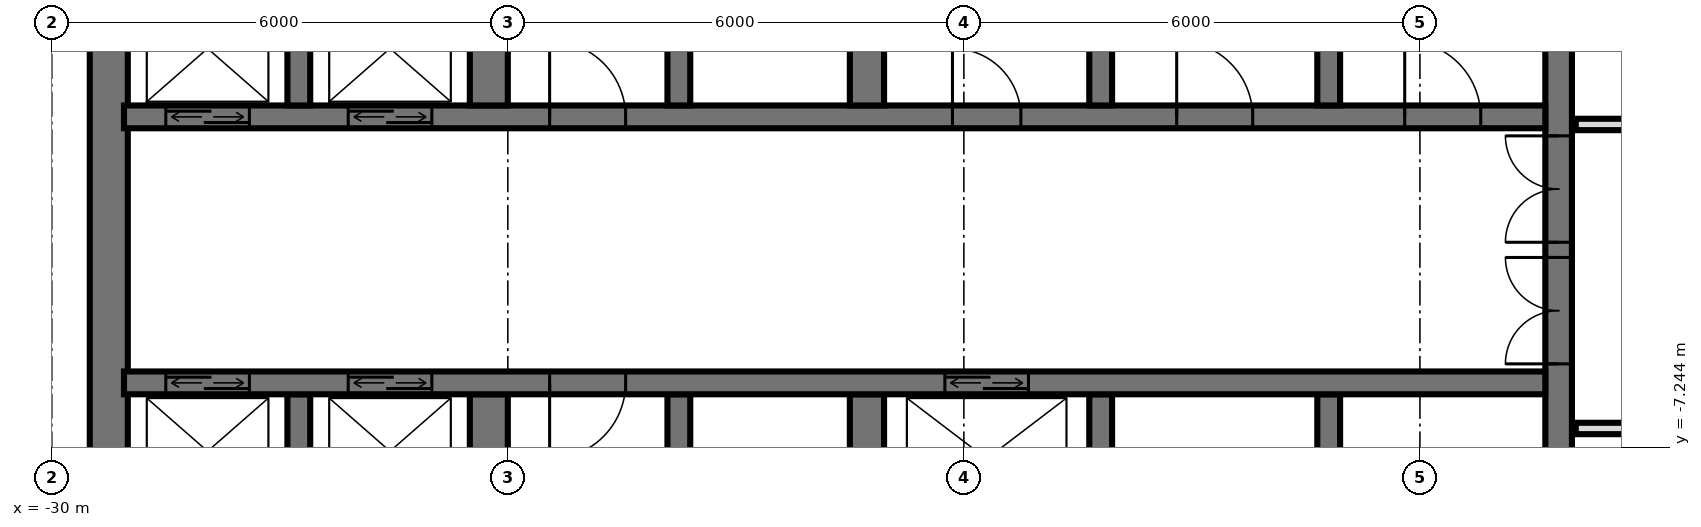
"""IFC4 building model, lengths in metres.
Left out: names, types, materials, properties, quantities, classifications, styles, units other than length and angle.
Written with IfcOpenShell. Run it as: python <this file> out.ifc"""

import sys

from ifc_helpers import new_model, si_unit, direction, frame, frame_2d, origin, place, context, subcontext, project, spatial, rectangle, extrude, element, fill, save


model = new_model("IFC4")
c1 = context("Model", 3, precision=1e-05, world=origin(), true_north=direction((0.0, 1.0)))
c2 = subcontext(c1, "Body", "Model", "MODEL_VIEW")
j1 = project(units=[si_unit("LENGTHUNIT", "METRE"), si_unit("PLANEANGLEUNIT", "RADIAN")], contexts=[c1])
p1 = place(None, origin())
s1 = spatial("IfcSite", under=j1, at=p1, CompositionType="ELEMENT")
p2 = place(p1, origin())
s2 = spatial("IfcBuilding", under=s1, at=p2, CompositionType="ELEMENT")
p3 = place(p2, frame((0.0, 0.0, 96.0)))
s3 = spatial("IfcBuildingStorey", under=s2, at=p3, CompositionType="ELEMENT", Elevation=96.0)
p4 = place(p3, frame((-10.175, -14.55, 0.0), z_axis=(0.0, 0.0, 1.0), x_axis=(0.0, 1.0, 0.0)))
e1 = element("IfcWall", 1, at=p4, inside=s3, PredefinedType="SHEAR", context=c2, shape_type="SweptSolid", body=[
    extrude(rectangle(XDim=14.1, YDim=0.35, at=frame_2d((7.05, 0.0))), origin(), (0.0, 0.0, 1.0), 3.6),
])
p5 = place(p4, frame((8.4, 0.0, 0.0)))
e2 = element("IfcOpeningElement", 2, at=p5, cuts=e1, PredefinedType="OPENING", context=c2, shape_type="SweptSolid", body=[
    extrude(rectangle(XDim=1.4, YDim=2.4, at=frame_2d((0.7, 1.2))), frame((0.0, 0.185, 0.0), z_axis=(0.0, -1.0, 0.0), x_axis=(1.0, 0.0, 0.0)), (0.0, 0.0, 1.0), 0.37),
])
p6 = place(p4, frame((10.0, 0.0, 0.0)))
e3 = element("IfcOpeningElement", 3, at=p6, cuts=e1, PredefinedType="OPENING", context=c2, shape_type="SweptSolid", body=[
    extrude(rectangle(XDim=1.4, YDim=2.4, at=frame_2d((0.7, 1.2))), frame((0.0, 0.185, 0.0), z_axis=(0.0, -1.0, 0.0), x_axis=(1.0, 0.0, 0.0)), (0.0, 0.0, 1.0), 0.37),
])
p7 = place(p4, frame((4.0, 0.0, 0.0)))
e4 = element("IfcOpeningElement", 4, at=p7, cuts=e1, PredefinedType="OPENING", context=c2, shape_type="SweptSolid", body=[
    extrude(rectangle(XDim=1.2, YDim=2.1, at=frame_2d((0.6, 1.05))), frame((0.0, 0.185, 0.0), z_axis=(0.0, -1.0, 0.0), x_axis=(1.0, 0.0, 0.0)), (0.0, 0.0, 1.0), 0.37),
])
p8 = place(p3, frame((-29.25, -14.55, 0.0), z_axis=(0.0, 0.0, 1.0), x_axis=(0.0, 1.0, 0.0)))
e5 = element("IfcWall", 5, at=p8, inside=s3, PredefinedType="SHEAR", context=c2, shape_type="SweptSolid", body=[
    extrude(rectangle(XDim=14.1, YDim=0.5, at=frame_2d((7.05, 0.0))), origin(), (0.0, 0.0, 1.0), 3.6),
])
p9 = place(p3, frame((-29.05, -2.9, 0.0), z_axis=(0.0, 0.0, 1.0), x_axis=(1.0, 0.0, 0.0)))
e6 = element("IfcWall", 6, at=p9, inside=s3, PredefinedType="SHEAR", context=c2, shape_type="SweptSolid", body=[
    extrude(rectangle(XDim=18.7, YDim=0.3, at=frame_2d((9.35, 0.0))), origin(), (0.0, 0.0, 1.0), 3.6),
])
p10 = place(p9, frame((2.95, 0.0, 0.0)))
e7 = element("IfcOpeningElement", 7, at=p10, cuts=e6, PredefinedType="OPENING", context=c2, shape_type="SweptSolid", body=[
    extrude(rectangle(XDim=1.1, YDim=2.1, at=frame_2d((0.55, 1.05))), frame((0.0, 0.16, 0.0), z_axis=(0.0, -1.0, 0.0), x_axis=(1.0, 0.0, 0.0)), (0.0, 0.0, 1.0), 0.32),
])
p11 = place(p9, frame((0.55, 0.0, 0.0)))
e8 = element("IfcOpeningElement", 8, at=p11, cuts=e6, PredefinedType="OPENING", context=c2, shape_type="SweptSolid", body=[
    extrude(rectangle(XDim=1.1, YDim=2.1, at=frame_2d((0.55, 1.05))), frame((0.0, 0.16, 0.0), z_axis=(0.0, -1.0, 0.0), x_axis=(1.0, 0.0, 0.0)), (0.0, 0.0, 1.0), 0.32),
])
p12 = place(p9, frame((10.9, 0.0, 0.0)))
e9 = element("IfcOpeningElement", 9, at=p12, cuts=e6, PredefinedType="OPENING", context=c2, shape_type="SweptSolid", body=[
    extrude(rectangle(XDim=0.9, YDim=2.1, at=frame_2d((0.45, 1.05))), frame((0.0, 0.16, 0.0), z_axis=(0.0, -1.0, 0.0), x_axis=(1.0, 0.0, 0.0)), (0.0, 0.0, 1.0), 0.32),
])
p13 = place(p9, frame((16.85, 0.0, 0.0)))
e10 = element("IfcOpeningElement", 10, at=p13, cuts=e6, PredefinedType="OPENING", context=c2, shape_type="SweptSolid", body=[
    extrude(rectangle(XDim=1.0, YDim=2.1, at=frame_2d((0.5, 1.05))), frame((0.0, 0.16, 0.0), z_axis=(0.0, -1.0, 0.0), x_axis=(1.0, 0.0, 0.0)), (0.0, 0.0, 1.0), 0.32),
])
p14 = place(p9, frame((13.85, 0.0, 0.0)))
e11 = element("IfcOpeningElement", 11, at=p14, cuts=e6, PredefinedType="OPENING", context=c2, shape_type="SweptSolid", body=[
    extrude(rectangle(XDim=1.0, YDim=2.1, at=frame_2d((0.5, 1.05))), frame((0.0, 0.16, 0.0), z_axis=(0.0, -1.0, 0.0), x_axis=(1.0, 0.0, 0.0)), (0.0, 0.0, 1.0), 0.32),
])
p15 = place(p9, frame((5.6, 0.0, 0.0)))
e12 = element("IfcOpeningElement", 12, at=p15, cuts=e6, PredefinedType="OPENING", context=c2, shape_type="SweptSolid", body=[
    extrude(rectangle(XDim=1.0, YDim=2.1, at=frame_2d((0.5, 1.05))), frame((0.0, 0.16, 0.0), z_axis=(0.0, -1.0, 0.0), x_axis=(1.0, 0.0, 0.0)), (0.0, 0.0, 1.0), 0.32),
])
p16 = place(p3, frame((-29.05, -6.4, 0.0), z_axis=(0.0, 0.0, 1.0), x_axis=(1.0, 0.0, 0.0)))
e13 = element("IfcWall", 13, at=p16, inside=s3, PredefinedType="SHEAR", context=c2, shape_type="SweptSolid", body=[
    extrude(rectangle(XDim=18.7, YDim=0.3, at=frame_2d((9.35, 0.0))), origin(), (0.0, 0.0, 1.0), 3.6),
])
p17 = place(p16, frame((2.95, 0.0, 0.0)))
e14 = element("IfcOpeningElement", 14, at=p17, cuts=e13, PredefinedType="OPENING", context=c2, shape_type="SweptSolid", body=[
    extrude(rectangle(XDim=1.1, YDim=2.1, at=frame_2d((0.55, 1.05))), frame((0.0, 0.16, 0.0), z_axis=(0.0, -1.0, 0.0), x_axis=(1.0, 0.0, 0.0)), (0.0, 0.0, 1.0), 0.32),
])
p18 = place(p16, frame((0.55, 0.0, 0.0)))
e15 = element("IfcOpeningElement", 15, at=p18, cuts=e13, PredefinedType="OPENING", context=c2, shape_type="SweptSolid", body=[
    extrude(rectangle(XDim=1.1, YDim=2.1, at=frame_2d((0.55, 1.05))), frame((0.0, 0.16, 0.0), z_axis=(0.0, -1.0, 0.0), x_axis=(1.0, 0.0, 0.0)), (0.0, 0.0, 1.0), 0.32),
])
p19 = place(p16, frame((10.8, 0.0, 0.0)))
e16 = element("IfcOpeningElement", 16, at=p19, cuts=e13, PredefinedType="OPENING", context=c2, shape_type="SweptSolid", body=[
    extrude(rectangle(XDim=1.1, YDim=2.1, at=frame_2d((0.55, 1.05))), frame((0.0, 0.16, 0.0), z_axis=(0.0, -1.0, 0.0), x_axis=(1.0, 0.0, 0.0)), (0.0, 0.0, 1.0), 0.32),
])
p20 = place(p16, frame((5.6, 0.0, 0.0)))
e17 = element("IfcOpeningElement", 17, at=p20, cuts=e13, PredefinedType="OPENING", context=c2, shape_type="SweptSolid", body=[
    extrude(rectangle(XDim=1.0, YDim=2.1, at=frame_2d((0.5, 1.05))), frame((0.0, 0.16, 0.0), z_axis=(0.0, -1.0, 0.0), x_axis=(1.0, 0.0, 0.0)), (0.0, 0.0, 1.0), 0.32),
])
for number, where, z_axis, x_axis in (
    (18, (-13.2, -2.75, 0.0), (0.0, 0.0, 1.0), (0.0, 1.0, 0.0)),
    (19, (-13.2, -8.85, 0.0), (0.0, 0.0, 1.0), (0.0, 1.0, 0.0)),
    (20, (-16.2, -2.75, 0.0), (0.0, 0.0, 1.0), (0.0, 1.0, 0.0)),
    (21, (-16.2, -8.85, 0.0), (0.0, 0.0, 1.0), (0.0, 1.0, 0.0)),
):
    element("IfcWall", number, at=place(p3, frame(where, z_axis=z_axis, x_axis=x_axis)), inside=s3, PredefinedType="SHEAR", context=c2, shape_type="SweptSolid", body=[
        extrude(rectangle(XDim=2.3, YDim=0.3, at=frame_2d((1.15, 0.0))), origin(), (0.0, 0.0, 1.0), 3.6),
    ])
for number, where, z_axis, x_axis in (
    (22, (-19.275, -2.75, 0.0), (0.0, 0.0, 1.0), (0.0, 1.0, 0.0)),
    (23, (-19.275, -8.85, 0.0), (0.0, 0.0, 1.0), (0.0, 1.0, 0.0)),
):
    element("IfcWall", number, at=place(p3, frame(where, z_axis=z_axis, x_axis=x_axis)), inside=s3, PredefinedType="SHEAR", context=c2, shape_type="SweptSolid", body=[
        extrude(rectangle(XDim=2.3, YDim=0.45, at=frame_2d((1.15, 0.0))), origin(), (0.0, 0.0, 1.0), 3.6),
    ])
for number, where, z_axis, x_axis in (
    (24, (-21.75, -2.75, 0.0), (0.0, 0.0, 1.0), (0.0, 1.0, 0.0)),
    (25, (-21.75, -8.85, 0.0), (0.0, 0.0, 1.0), (0.0, 1.0, 0.0)),
):
    element("IfcWall", number, at=place(p3, frame(where, z_axis=z_axis, x_axis=x_axis)), inside=s3, PredefinedType="SHEAR", context=c2, shape_type="SweptSolid", body=[
        extrude(rectangle(XDim=2.3, YDim=0.3, at=frame_2d((1.15, 0.0))), origin(), (0.0, 0.0, 1.0), 3.6),
    ])
for number, where, z_axis, x_axis in (
    (26, (-24.25, -2.75, 0.0), (0.0, 0.0, 1.0), (0.0, 1.0, 0.0)),
    (27, (-24.25, -8.85, 0.0), (0.0, 0.0, 1.0), (0.0, 1.0, 0.0)),
):
    element("IfcWall", number, at=place(p3, frame(where, z_axis=z_axis, x_axis=x_axis)), inside=s3, PredefinedType="SHEAR", context=c2, shape_type="SweptSolid", body=[
        extrude(rectangle(XDim=2.3, YDim=0.5, at=frame_2d((1.15, 0.0))), origin(), (0.0, 0.0, 1.0), 3.6),
    ])
for number, where, z_axis, x_axis in (
    (28, (-26.75, -2.75, 0.0), (0.0, 0.0, 1.0), (0.0, 1.0, 0.0)),
    (29, (-26.75, -8.85, 0.0), (0.0, 0.0, 1.0), (0.0, 1.0, 0.0)),
):
    element("IfcWall", number, at=place(p3, frame(where, z_axis=z_axis, x_axis=x_axis)), inside=s3, PredefinedType="SHEAR", context=c2, shape_type="SweptSolid", body=[
        extrude(rectangle(XDim=2.3, YDim=0.3, at=frame_2d((1.15, 0.0))), origin(), (0.0, 0.0, 1.0), 3.6),
    ])
p21 = place(p3, frame((-9.95, -7.0, 0.0), z_axis=(0.0, 0.0, 1.0), x_axis=(1.0, 0.0, 0.0)))
e30 = element("IfcWall", 30, at=p21, inside=s3, PredefinedType="PARTITIONING", context=c2, shape_type="SweptSolid", body=[
    extrude(rectangle(XDim=19.9, YDim=0.15, at=frame_2d((9.95, 0.0))), origin(), (0.0, 0.0, 1.0), 3.32),
])
p22 = place(p21, frame((9.45, 0.0, 0.0)))
e31 = element("IfcOpeningElement", 31, at=p22, cuts=e30, PredefinedType="OPENING", context=c2, shape_type="SweptSolid", body=[
    extrude(rectangle(XDim=1.0, YDim=2.1, at=frame_2d((0.5, 1.05))), frame((0.0, 0.085, 0.0), z_axis=(0.0, -1.0, 0.0), x_axis=(1.0, 0.0, 0.0)), (0.0, 0.0, 1.0), 0.17),
])
p23 = place(p21, frame((3.45, 0.0, 0.0)))
e32 = element("IfcOpeningElement", 32, at=p23, cuts=e30, PredefinedType="OPENING", context=c2, shape_type="SweptSolid", body=[
    extrude(rectangle(XDim=1.0, YDim=2.1, at=frame_2d((0.5, 1.05))), frame((0.0, 0.085, 0.0), z_axis=(0.0, -1.0, 0.0), x_axis=(1.0, 0.0, 0.0)), (0.0, 0.0, 1.0), 0.17),
])
p24 = place(p3, frame((-9.95, -3.0, 0.0), z_axis=(0.0, 0.0, 1.0), x_axis=(1.0, 0.0, 0.0)))
e33 = element("IfcWall", 33, at=p24, inside=s3, PredefinedType="PARTITIONING", context=c2, shape_type="SweptSolid", body=[
    extrude(rectangle(XDim=19.9, YDim=0.15, at=frame_2d((9.95, 0.0))), origin(), (0.0, 0.0, 1.0), 3.32),
])
p25 = place(p24, frame((0.95, 0.0, 0.0)))
e34 = element("IfcOpeningElement", 34, at=p25, cuts=e33, PredefinedType="OPENING", context=c2, shape_type="SweptSolid", body=[
    extrude(rectangle(XDim=1.0, YDim=2.1, at=frame_2d((0.5, 1.05))), frame((0.0, 0.085, 0.0), z_axis=(0.0, -1.0, 0.0), x_axis=(1.0, 0.0, 0.0)), (0.0, 0.0, 1.0), 0.17),
])
p26 = place(p24, frame((3.7, 0.0, 0.0)))
e35 = element("IfcOpeningElement", 35, at=p26, cuts=e33, PredefinedType="OPENING", context=c2, shape_type="SweptSolid", body=[
    extrude(rectangle(XDim=1.0, YDim=2.1, at=frame_2d((0.5, 1.05))), frame((0.0, 0.085, 0.0), z_axis=(0.0, -1.0, 0.0), x_axis=(1.0, 0.0, 0.0)), (0.0, 0.0, 1.0), 0.17),
])
p27 = place(p24, frame((6.7, 0.0, 0.0)))
e36 = element("IfcOpeningElement", 36, at=p27, cuts=e33, PredefinedType="OPENING", context=c2, shape_type="SweptSolid", body=[
    extrude(rectangle(XDim=1.0, YDim=2.1, at=frame_2d((0.5, 1.05))), frame((0.0, 0.085, 0.0), z_axis=(0.0, -1.0, 0.0), x_axis=(1.0, 0.0, 0.0)), (0.0, 0.0, 1.0), 0.17),
])
p28 = place(p24, frame((13.95, 0.0, 0.0)))
e37 = element("IfcOpeningElement", 37, at=p28, cuts=e33, PredefinedType="OPENING", context=c2, shape_type="SweptSolid", body=[
    extrude(rectangle(XDim=1.0, YDim=2.1, at=frame_2d((0.5, 1.05))), frame((0.0, 0.085, 0.0), z_axis=(0.0, -1.0, 0.0), x_axis=(1.0, 0.0, 0.0)), (0.0, 0.0, 1.0), 0.17),
])
p29 = place(p10, origin())
e38 = element("IfcDoor", 38, at=p29, inside=s3, OperationType="DOUBLE_DOOR_SLIDING", PredefinedType="USERDEFINED", context=c2, shape_type="SweptSolid", body=[
    extrude(rectangle(XDim=1.1, YDim=2.1, at=frame_2d((0.55, 1.05))), frame((0.0, 0.025, 0.0), z_axis=(0.0, -1.0, 0.0), x_axis=(1.0, 0.0, 0.0)), (0.0, 0.0, 1.0), 0.05),
])
fill(e7, e38)
p30 = place(p11, origin())
e39 = element("IfcDoor", 39, at=p30, inside=s3, OperationType="DOUBLE_DOOR_SLIDING", PredefinedType="USERDEFINED", context=c2, shape_type="SweptSolid", body=[
    extrude(rectangle(XDim=1.1, YDim=2.1, at=frame_2d((0.55, 1.05))), frame((0.0, 0.025, 0.0), z_axis=(0.0, -1.0, 0.0), x_axis=(1.0, 0.0, 0.0)), (0.0, 0.0, 1.0), 0.05),
])
fill(e8, e39)
p31 = place(p17, origin())
e40 = element("IfcDoor", 40, at=p31, inside=s3, OperationType="DOUBLE_DOOR_SLIDING", PredefinedType="USERDEFINED", context=c2, shape_type="SweptSolid", body=[
    extrude(rectangle(XDim=1.1, YDim=2.1, at=frame_2d((0.55, 1.05))), frame((0.0, 0.025, 0.0), z_axis=(0.0, -1.0, 0.0), x_axis=(1.0, 0.0, 0.0)), (0.0, 0.0, 1.0), 0.05),
])
fill(e14, e40)
p32 = place(p18, origin())
e41 = element("IfcDoor", 41, at=p32, inside=s3, OperationType="DOUBLE_DOOR_SLIDING", PredefinedType="USERDEFINED", context=c2, shape_type="SweptSolid", body=[
    extrude(rectangle(XDim=1.1, YDim=2.1, at=frame_2d((0.55, 1.05))), frame((0.0, 0.025, 0.0), z_axis=(0.0, -1.0, 0.0), x_axis=(1.0, 0.0, 0.0)), (0.0, 0.0, 1.0), 0.05),
])
fill(e15, e41)
p33 = place(p19, origin())
e42 = element("IfcDoor", 42, at=p33, inside=s3, OperationType="DOUBLE_DOOR_SLIDING", PredefinedType="USERDEFINED", context=c2, shape_type="SweptSolid", body=[
    extrude(rectangle(XDim=1.1, YDim=2.1, at=frame_2d((0.55, 1.05))), frame((0.0, 0.025, 0.0), z_axis=(0.0, -1.0, 0.0), x_axis=(1.0, 0.0, 0.0)), (0.0, 0.0, 1.0), 0.05),
])
fill(e16, e42)
p34 = place(p5, origin())
e43 = element("IfcDoor", 43, at=p34, inside=s3, OperationType="DOUBLE_DOOR_SINGLE_SWING", PredefinedType="DOOR", context=c2, shape_type="SweptSolid", body=[
    extrude(rectangle(XDim=1.4, YDim=2.4, at=frame_2d((0.7, 1.2))), frame((0.0, 0.025, 0.0), z_axis=(0.0, -1.0, 0.0), x_axis=(1.0, 0.0, 0.0)), (0.0, 0.0, 1.0), 0.05),
])
fill(e2, e43)
p35 = place(p6, origin())
e44 = element("IfcDoor", 44, at=p35, inside=s3, OperationType="DOUBLE_DOOR_SINGLE_SWING", PredefinedType="DOOR", context=c2, shape_type="SweptSolid", body=[
    extrude(rectangle(XDim=1.4, YDim=2.4, at=frame_2d((0.7, 1.2))), frame((0.0, 0.025, 0.0), z_axis=(0.0, -1.0, 0.0), x_axis=(1.0, 0.0, 0.0)), (0.0, 0.0, 1.0), 0.05),
])
fill(e3, e44)
p36 = place(p12, origin())
e45 = element("IfcDoor", 45, at=p36, inside=s3, OperationType="SINGLE_SWING_RIGHT", PredefinedType="DOOR", context=c2, shape_type="SweptSolid", body=[
    extrude(rectangle(XDim=0.9, YDim=2.1, at=frame_2d((0.45, 1.05))), frame((0.0, 0.025, 0.0), z_axis=(0.0, -1.0, 0.0), x_axis=(1.0, 0.0, 0.0)), (0.0, 0.0, 1.0), 0.05),
])
fill(e9, e45)
p37 = place(p13, origin())
e46 = element("IfcDoor", 46, at=p37, inside=s3, OperationType="SINGLE_SWING_RIGHT", PredefinedType="DOOR", context=c2, shape_type="SweptSolid", body=[
    extrude(rectangle(XDim=1.0, YDim=2.1, at=frame_2d((0.5, 1.05))), frame((0.0, 0.025, 0.0), z_axis=(0.0, -1.0, 0.0), x_axis=(1.0, 0.0, 0.0)), (0.0, 0.0, 1.0), 0.05),
])
fill(e10, e46)
p38 = place(p14, origin())
e47 = element("IfcDoor", 47, at=p38, inside=s3, OperationType="SINGLE_SWING_RIGHT", PredefinedType="DOOR", context=c2, shape_type="SweptSolid", body=[
    extrude(rectangle(XDim=1.0, YDim=2.1, at=frame_2d((0.5, 1.05))), frame((0.0, 0.025, 0.0), z_axis=(0.0, -1.0, 0.0), x_axis=(1.0, 0.0, 0.0)), (0.0, 0.0, 1.0), 0.05),
])
fill(e11, e47)
p39 = place(p15, origin())
e48 = element("IfcDoor", 48, at=p39, inside=s3, OperationType="SINGLE_SWING_RIGHT", PredefinedType="DOOR", context=c2, shape_type="SweptSolid", body=[
    extrude(rectangle(XDim=1.0, YDim=2.1, at=frame_2d((0.5, 1.05))), frame((0.0, 0.025, 0.0), z_axis=(0.0, -1.0, 0.0), x_axis=(1.0, 0.0, 0.0)), (0.0, 0.0, 1.0), 0.05),
])
fill(e12, e48)
p40 = place(p20, frame((0.5, 0.0, 0.0), z_axis=(0.0, 0.0, 1.0), x_axis=(-1.0, 0.0, 0.0)))
e49 = element("IfcDoor", 49, at=p40, inside=s3, OperationType="SINGLE_SWING_LEFT", PredefinedType="DOOR", context=c2, shape_type="SweptSolid", body=[
    extrude(rectangle(XDim=1.0, YDim=2.1, at=frame_2d((0.0, 1.05))), frame((0.0, -0.025, 0.0), z_axis=(0.0, 1.0, 0.0), x_axis=(-1.0, 0.0, 0.0)), (0.0, 0.0, 1.0), 0.05),
])
fill(e17, e49)
save(model, sys.argv[1])
